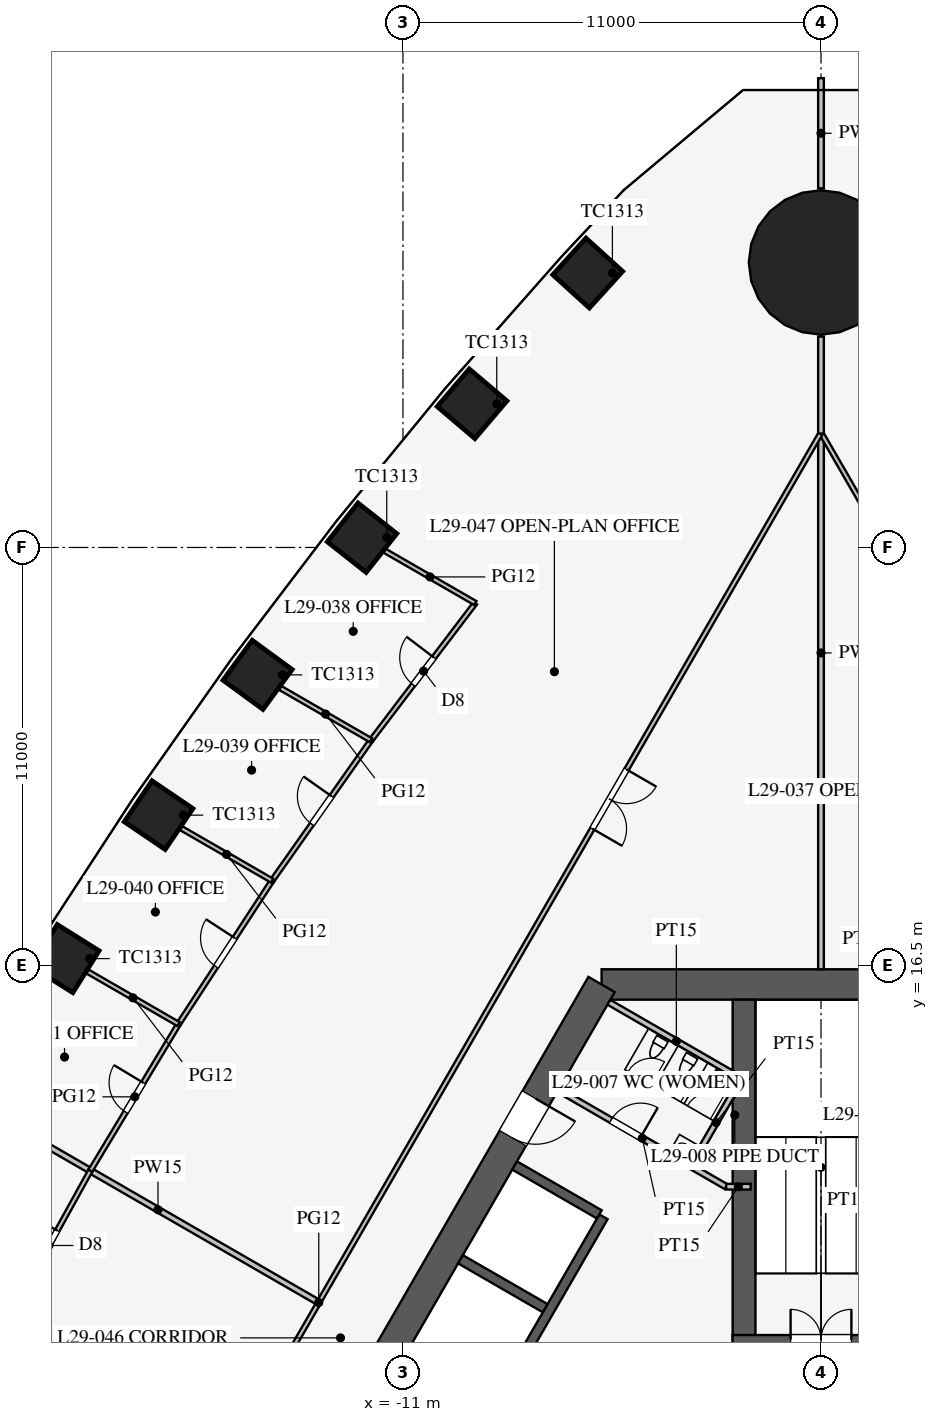
"""IFC4 building model, lengths in metres.
Left out: names, types, materials, properties, quantities, classifications, styles, units other than length and angle.
Written with IfcOpenShell. Run it as: python <this file> out.ifc"""

import sys

from ifc_helpers import new_model, si_unit, direction, frame, frame_2d, origin, origin_2d, place, context, subcontext, project, spatial, rectangle, circle, extrude, element, fill, save


model = new_model("IFC4")
c1 = context("Model", 3, precision=1e-05, world=origin(), true_north=direction((0.0, 1.0)))
c2 = subcontext(c1, "Body", "Model", "MODEL_VIEW")
j1 = project(units=[si_unit("LENGTHUNIT", "METRE"), si_unit("PLANEANGLEUNIT", "RADIAN")], contexts=[c1])
p1 = place(None, origin())
s1 = spatial("IfcSite", under=j1, at=p1, CompositionType="ELEMENT")
p2 = place(p1, origin())
s2 = spatial("IfcBuilding", under=s1, at=p2, CompositionType="ELEMENT")
p3 = place(p2, frame((0.0, 0.0, 128.3)))
s3 = spatial("IfcBuildingStorey", under=s2, at=p3, CompositionType="ELEMENT", Elevation=128.3)
for number, where, z_axis, x_axis in (
    (1, (-6.139, 34.721, 0.0), (0.0, 0.0, 1.0), (-0.672, -0.74, 0.0)),
    (2, (-9.182, 31.282, 0.0), (0.0, 0.0, 1.0), (-0.648, -0.762, 0.0)),
    (3, (-12.077, 27.757, 0.0), (0.0, 0.0, 1.0), (-0.62, -0.785, 0.0)),
    (4, (-14.825, 24.148, 0.0), (0.0, 0.0, 1.0), (-0.591, -0.807, 0.0)),
    (5, (-17.43, 20.456, 0.0), (0.0, 0.0, 1.0), (-0.561, -0.828, 0.0)),
    (6, (-19.893, 16.681, 0.0), (0.0, 0.0, 1.0), (-0.531, -0.847, 0.0)),
):
    element("IfcColumn", number, at=place(p3, frame(where, z_axis=z_axis, x_axis=x_axis)), inside=s3, PredefinedType="COLUMN", context=c2, shape_type="SweptSolid", body=[
        extrude(rectangle(XDim=1.3, YDim=1.3, at=origin_2d()), origin(), (0.0, 0.0, 1.0), 4.2),
    ])
p4 = place(p3, frame((0.0, 35.0, 0.0), z_axis=(0.0, 0.0, 1.0), x_axis=(1.0, 0.0, 0.0)))
e7 = element("IfcColumn", 7, at=p4, inside=s3, PredefinedType="COLUMN", context=c2, shape_type="SweptSolid", body=[
    extrude(circle(Radius=1.9, at=origin_2d()), origin(), (0.0, 0.0, 1.0), 4.2),
])
p5 = place(p3, frame((5.773, 16.0, 0.0), z_axis=(0.0, 0.0, 1.0), x_axis=(-1.0, 0.0, 0.0)))
e8 = element("IfcWall", 8, at=p5, inside=s3, PredefinedType="SHEAR", context=c2, shape_type="SweptSolid", body=[
    extrude(rectangle(XDim=11.547, YDim=0.8, at=frame_2d((5.773, 0.0))), origin(), (0.0, 0.0, 1.0), 4.2),
])
p6 = place(p3, frame((-5.773, 16.0, 0.0), z_axis=(0.0, 0.0, 1.0), x_axis=(-0.500002442456, -0.866023993627, 0.0)))
e9 = element("IfcWall", 9, at=p6, inside=s3, PredefinedType="SHEAR", context=c2, shape_type="SweptSolid", body=[
    extrude(rectangle(XDim=21.939, YDim=0.8, at=frame_2d((10.97, 0.0))), origin(), (0.0, 0.0, 1.0), 4.2),
])
p7 = place(p6, frame((17.27, 0.0, 0.0)))
e10 = element("IfcOpeningElement", 10, at=p7, cuts=e9, PredefinedType="OPENING", context=c2, shape_type="SweptSolid", body=[
    extrude(rectangle(XDim=1.2, YDim=2.1, at=frame_2d((0.6, 1.05))), frame((0.0, 0.41, 0.0), z_axis=(0.0, -1.0, 0.0), x_axis=(1.0, 0.0, 0.0)), (0.0, 0.0, 1.0), 0.82),
])
p8 = place(p6, frame((3.47, 0.0, 0.0)))
e11 = element("IfcOpeningElement", 11, at=p8, cuts=e9, PredefinedType="OPENING", context=c2, shape_type="SweptSolid", body=[
    extrude(rectangle(XDim=1.2, YDim=2.1, at=frame_2d((0.6, 1.05))), frame((0.0, 0.41, 0.0), z_axis=(0.0, -1.0, 0.0), x_axis=(1.0, 0.0, 0.0)), (0.0, 0.0, 1.0), 0.82),
])
p9 = place(p3, frame((-5.724, 9.886, 0.0), z_axis=(0.0, 0.0, 1.0), x_axis=(-0.500001763848, -0.866024385424, 0.0)))
e12 = element("IfcWall", 12, at=p9, inside=s3, PredefinedType="SHEAR", context=c2, shape_type="SweptSolid", body=[
    extrude(rectangle(XDim=11.4, YDim=0.25, at=frame_2d((5.7, 0.0))), origin(), (0.0, 0.0, 1.0), 4.2),
])
p10 = place(p9, frame((6.525, 0.0, 0.0)))
e13 = element("IfcOpeningElement", 13, at=p10, cuts=e12, PredefinedType="OPENING", context=c2, shape_type="SweptSolid", body=[
    extrude(rectangle(XDim=1.2, YDim=2.2, at=frame_2d((0.6, 1.1))), frame((0.0, 0.135, 0.0), z_axis=(0.0, -1.0, 0.0), x_axis=(1.0, 0.0, 0.0)), (0.0, 0.0, 1.0), 0.27),
])
p11 = place(p9, frame((9.375, 0.0, 0.0)))
e14 = element("IfcOpeningElement", 14, at=p11, cuts=e12, PredefinedType="OPENING", context=c2, shape_type="SweptSolid", body=[
    extrude(rectangle(XDim=1.2, YDim=2.2, at=frame_2d((0.6, 1.1))), frame((0.0, 0.135, 0.0), z_axis=(0.0, -1.0, 0.0), x_axis=(1.0, 0.0, 0.0)), (0.0, 0.0, 1.0), 0.27),
])
p12 = place(p3, frame((-5.832, 9.949, 0.0), z_axis=(0.0, 0.0, 1.0), x_axis=(-0.866029291668, 0.499993265928, 0.0)))
e15 = element("IfcWall", 15, at=p12, inside=s3, PredefinedType="SHEAR", context=c2, shape_type="SweptSolid", body=[
    extrude(rectangle(XDim=2.575, YDim=0.25, at=frame_2d((1.288, 0.0))), origin(), (0.0, 0.0, 1.0), 4.2),
])
p13 = place(p3, frame((-7.257, 7.481, 0.0), z_axis=(0.0, 0.0, 1.0), x_axis=(-0.866046643894, 0.499963209246, 0.0)))
e16 = element("IfcWall", 16, at=p13, inside=s3, PredefinedType="SHEAR", context=c2, shape_type="SweptSolid", body=[
    extrude(rectangle(XDim=2.575, YDim=0.25, at=frame_2d((1.288, 0.0))), origin(), (0.0, 0.0, 1.0), 4.2),
])
p14 = place(p3, frame((-2.025, 6.525, 0.0), z_axis=(0.0, 0.0, 1.0), x_axis=(0.0, 1.0, 0.0)))
e17 = element("IfcWall", 17, at=p14, inside=s3, PredefinedType="SHEAR", context=c2, shape_type="SweptSolid", body=[
    extrude(rectangle(XDim=9.075, YDim=0.6, at=frame_2d((4.538, 0.0))), origin(), (0.0, 0.0, 1.0), 4.2),
])
p15 = place(p3, frame((2.325, 6.65, 0.0), z_axis=(0.0, 0.0, 1.0), x_axis=(-1.0, 0.0, 0.0)))
e18 = element("IfcWall", 18, at=p15, inside=s3, PredefinedType="SHEAR", context=c2, shape_type="SweptSolid", body=[
    extrude(rectangle(XDim=4.65, YDim=0.25, at=frame_2d((2.325, 0.0))), origin(), (0.0, 0.0, 1.0), 4.2),
])
p16 = place(p15, frame((1.525, 0.0, 0.0)))
e19 = element("IfcOpeningElement", 19, at=p16, cuts=e18, PredefinedType="OPENING", context=c2, shape_type="SweptSolid", body=[
    extrude(rectangle(XDim=1.6, YDim=2.1, at=frame_2d((0.8, 1.05))), frame((0.0, 0.135, 0.0), z_axis=(0.0, -1.0, 0.0), x_axis=(1.0, 0.0, 0.0)), (0.0, 0.0, 1.0), 0.27),
])
p17 = place(p3, frame((-2.495, 10.678, 0.0), z_axis=(0.0, 0.0, 1.0), x_axis=(-0.86602216432, 0.500005610874, 0.0)))
e20 = element("IfcWall", 20, at=p17, inside=s3, PredefinedType="PARTITIONING", context=c2, shape_type="SweptSolid", body=[
    extrude(rectangle(XDim=5.1, YDim=0.15, at=frame_2d((2.55, 0.0))), origin(), (0.0, 0.0, 1.0), 4.0),
])
p18 = place(p17, frame((2.6, 0.0, 0.0)))
e21 = element("IfcOpeningElement", 21, at=p18, cuts=e20, PredefinedType="OPENING", context=c2, shape_type="SweptSolid", body=[
    extrude(rectangle(XDim=0.9, YDim=2.1, at=frame_2d((0.45, 1.05))), frame((0.0, 0.085, 0.0), z_axis=(0.0, -1.0, 0.0), x_axis=(1.0, 0.0, 0.0)), (0.0, 0.0, 1.0), 0.17),
])
p19 = place(p3, frame((-2.495, 10.678, 0.0), z_axis=(0.0, 0.0, 1.0), x_axis=(1.0, 0.0, 0.0)))
e22 = element("IfcWall", 22, at=p19, inside=s3, PredefinedType="PARTITIONING", context=c2, shape_type="SweptSolid", body=[
    extrude(rectangle(XDim=0.645, YDim=0.15, at=frame_2d((0.323, 0.0))), origin(), (0.0, 0.0, 1.0), 4.0),
])
p20 = place(p3, frame((-2.031, 13.482, 0.0), z_axis=(0.0, 0.0, 1.0), x_axis=(-0.866050731258, 0.499956128963, 0.0)))
e23 = element("IfcWall", 23, at=p20, inside=s3, PredefinedType="PARTITIONING", context=c2, shape_type="SweptSolid", body=[
    extrude(rectangle(XDim=4.1, YDim=0.15, at=frame_2d((2.05, 0.0))), origin(), (0.0, 0.0, 1.0), 4.0),
])
p21 = place(p3, frame((-3.389, 11.281, 0.0), z_axis=(0.0, 0.0, 1.0), x_axis=(0.499989096993, 0.866031698547, 0.0)))
e24 = element("IfcWall", 24, at=p21, inside=s3, PredefinedType="PARTITIONING", context=c2, shape_type="SweptSolid", body=[
    extrude(rectangle(XDim=2.51, YDim=0.15, at=frame_2d((1.255, 0.0))), origin(), (0.0, 0.0, 1.0), 4.0),
])
p22 = place(p3, frame((0.0, 16.4, 0.0), z_axis=(0.0, 0.0, 1.0), x_axis=(0.0, 1.0, 0.0)))
e25 = element("IfcWall", 25, at=p22, inside=s3, PredefinedType="PARTITIONING", context=c2, shape_type="SweptSolid", body=[
    extrude(rectangle(XDim=16.65, YDim=0.15, at=frame_2d((8.325, 0.0))), origin(), (0.0, 0.0, 1.0), 2.3),
])
p23 = place(p3, frame((0.0, 36.95, 0.0), z_axis=(0.0, 0.0, 1.0), x_axis=(0.0, 1.0, 0.0)))
e26 = element("IfcWall", 26, at=p23, inside=s3, PredefinedType="PARTITIONING", context=c2, shape_type="SweptSolid", body=[
    extrude(rectangle(XDim=2.899, YDim=0.15, at=frame_2d((1.45, 0.0))), origin(), (0.0, 0.0, 1.0), 2.3),
])
p24 = place(p3, frame((26.415, -15.231, 0.0), z_axis=(0.0, 0.0, 1.0), x_axis=(-0.50000091641, 0.866024874695, 0.0)))
e27 = element("IfcWall", 27, at=p24, inside=s3, PredefinedType="PARTITIONING", context=c2, shape_type="SweptSolid", body=[
    extrude(rectangle(XDim=52.796, YDim=0.12, at=frame_2d((26.398, 0.0))), origin(), (0.0, 0.0, 1.0), 2.9),
])
p25 = place(p24, frame((10.2, 0.0, 0.15)))
e28 = element("IfcOpeningElement", 28, at=p25, cuts=e27, PredefinedType="OPENING", context=c2, shape_type="SweptSolid", body=[
    extrude(rectangle(XDim=1.8, YDim=2.1, at=frame_2d((0.9, 1.05))), frame((0.0, 0.07, 0.0), z_axis=(0.0, -1.0, 0.0), x_axis=(1.0, 0.0, 0.0)), (0.0, 0.0, 1.0), 0.14),
])
p26 = place(p24, frame((40.8, 0.0, 0.15)))
e29 = element("IfcOpeningElement", 29, at=p26, cuts=e27, PredefinedType="OPENING", context=c2, shape_type="SweptSolid", body=[
    extrude(rectangle(XDim=1.8, YDim=2.1, at=frame_2d((0.9, 1.05))), frame((0.0, 0.07, 0.0), z_axis=(0.0, -1.0, 0.0), x_axis=(1.0, 0.0, 0.0)), (0.0, 0.0, 1.0), 0.14),
])
p27 = place(p3, frame((-13.268, 7.66, 0.0), z_axis=(0.0, 0.0, 1.0), x_axis=(-0.866015788683, 0.500016653474, 0.0)))
e30 = element("IfcWall", 30, at=p27, inside=s3, PredefinedType="PARTITIONING", context=c2, shape_type="SweptSolid", body=[
    extrude(rectangle(XDim=9.65, YDim=0.15, at=frame_2d((4.825, 0.0))), origin(), (0.0, 0.0, 1.0), 3.2),
])
p28 = place(p3, frame((-0.016, 30.491, 0.0), z_axis=(0.0, 0.0, 1.0), x_axis=(-0.50000091641, -0.866024874695, 0.0)))
e31 = element("IfcWall", 31, at=p28, inside=s3, PredefinedType="PARTITIONING", context=c2, shape_type="SweptSolid", body=[
    extrude(rectangle(XDim=52.796, YDim=0.12, at=frame_2d((26.398, 0.0))), origin(), (0.0, 0.0, 1.0), 2.9),
])
p29 = place(p28, frame((10.2, 0.0, 0.15)))
e32 = element("IfcOpeningElement", 32, at=p29, cuts=e31, PredefinedType="OPENING", context=c2, shape_type="SweptSolid", body=[
    extrude(rectangle(XDim=1.8, YDim=2.1, at=frame_2d((0.9, 1.05))), frame((0.0, 0.07, 0.0), z_axis=(0.0, -1.0, 0.0), x_axis=(1.0, 0.0, 0.0)), (0.0, 0.0, 1.0), 0.14),
])
p30 = place(p28, frame((40.8, 0.0, 0.15)))
e33 = element("IfcOpeningElement", 33, at=p30, cuts=e31, PredefinedType="OPENING", context=c2, shape_type="SweptSolid", body=[
    extrude(rectangle(XDim=1.8, YDim=2.1, at=frame_2d((0.9, 1.05))), frame((0.0, 0.07, 0.0), z_axis=(0.0, -1.0, 0.0), x_axis=(1.0, 0.0, 0.0)), (0.0, 0.0, 1.0), 0.14),
])
p31 = place(p3, frame((-19.226, 11.1, 0.0), z_axis=(0.0, 0.0, 1.0), x_axis=(-0.484292898211, -0.874905931368, 0.0)))
e34 = element("IfcWall", 34, at=p31, inside=s3, PredefinedType="PARTITIONING", context=c2, shape_type="SweptSolid", body=[
    extrude(rectangle(XDim=4.501, YDim=0.12, at=frame_2d((2.25, 0.0))), origin(), (0.0, 0.0, 1.0), 2.9),
])
p32 = place(p31, frame((1.8, 0.0, 0.15)))
e35 = element("IfcOpeningElement", 35, at=p32, cuts=e34, PredefinedType="OPENING", context=c2, shape_type="SweptSolid", body=[
    extrude(rectangle(XDim=0.9, YDim=2.1, at=frame_2d((0.45, 1.05))), frame((0.0, 0.07, 0.0), z_axis=(0.0, -1.0, 0.0), x_axis=(1.0, 0.0, 0.0)), (0.0, 0.0, 1.0), 0.14),
])
p33 = place(p3, frame((-11.842, 22.425, 0.0), z_axis=(0.0, 0.0, 1.0), x_axis=(-0.576023283708, -0.817433285734, 0.0)))
e36 = element("IfcWall", 36, at=p33, inside=s3, PredefinedType="PARTITIONING", context=c2, shape_type="SweptSolid", body=[
    extrude(rectangle(XDim=4.519, YDim=0.12, at=frame_2d((2.259, 0.0))), origin(), (0.0, 0.0, 1.0), 2.9),
])
p34 = place(p33, frame((1.8, 0.0, 0.15)))
e37 = element("IfcOpeningElement", 37, at=p34, cuts=e36, PredefinedType="OPENING", context=c2, shape_type="SweptSolid", body=[
    extrude(rectangle(XDim=0.9, YDim=2.1, at=frame_2d((0.45, 1.05))), frame((0.0, 0.07, 0.0), z_axis=(0.0, -1.0, 0.0), x_axis=(1.0, 0.0, 0.0)), (0.0, 0.0, 1.0), 0.14),
])
p35 = place(p3, frame((-9.096, 26.036, 0.0), z_axis=(0.0, 0.0, 1.0), x_axis=(-0.605240194184, -0.796042905467, 0.0)))
e38 = element("IfcWall", 38, at=p35, inside=s3, PredefinedType="PARTITIONING", context=c2, shape_type="SweptSolid", body=[
    extrude(rectangle(XDim=4.536, YDim=0.12, at=frame_2d((2.268, 0.0))), origin(), (0.0, 0.0, 1.0), 2.9),
])
p36 = place(p35, frame((1.8, 0.0, 0.15)))
e39 = element("IfcOpeningElement", 39, at=p36, cuts=e38, PredefinedType="OPENING", context=c2, shape_type="SweptSolid", body=[
    extrude(rectangle(XDim=0.9, YDim=2.1, at=frame_2d((0.45, 1.05))), frame((0.0, 0.07, 0.0), z_axis=(0.0, -1.0, 0.0), x_axis=(1.0, 0.0, 0.0)), (0.0, 0.0, 1.0), 0.14),
])
p37 = place(p3, frame((-16.905, 14.956, 0.0), z_axis=(0.0, 0.0, 1.0), x_axis=(-0.515548366618, -0.856860479703, 0.0)))
e40 = element("IfcWall", 40, at=p37, inside=s3, PredefinedType="PARTITIONING", context=c2, shape_type="SweptSolid", body=[
    extrude(rectangle(XDim=4.501, YDim=0.12, at=frame_2d((2.25, 0.0))), origin(), (0.0, 0.0, 1.0), 2.9),
])
p38 = place(p37, frame((1.8, 0.0, 0.15)))
e41 = element("IfcOpeningElement", 41, at=p38, cuts=e40, PredefinedType="OPENING", context=c2, shape_type="SweptSolid", body=[
    extrude(rectangle(XDim=0.9, YDim=2.1, at=frame_2d((0.45, 1.05))), frame((0.0, 0.07, 0.0), z_axis=(0.0, -1.0, 0.0), x_axis=(1.0, 0.0, 0.0)), (0.0, 0.0, 1.0), 0.14),
])
p39 = place(p3, frame((-14.444, 18.732, 0.0), z_axis=(0.0, 0.0, 1.0), x_axis=(-0.546069464151, -0.837739900161, 0.0)))
e42 = element("IfcWall", 42, at=p39, inside=s3, PredefinedType="PARTITIONING", context=c2, shape_type="SweptSolid", body=[
    extrude(rectangle(XDim=4.507, YDim=0.12, at=frame_2d((2.253, 0.0))), origin(), (0.0, 0.0, 1.0), 2.9),
])
p40 = place(p39, frame((1.8, 0.0, 0.15)))
e43 = element("IfcOpeningElement", 43, at=p40, cuts=e42, PredefinedType="OPENING", context=c2, shape_type="SweptSolid", body=[
    extrude(rectangle(XDim=0.9, YDim=2.1, at=frame_2d((0.45, 1.05))), frame((0.0, 0.07, 0.0), z_axis=(0.0, -1.0, 0.0), x_axis=(1.0, 0.0, 0.0)), (0.0, 0.0, 1.0), 0.14),
])
p41 = place(p3, frame((-11.842, 22.425, 0.0), z_axis=(0.0, 0.0, 1.0), x_axis=(-0.866053089527, 0.499952043821, 0.0)))
e44 = element("IfcWall", 44, at=p41, inside=s3, PredefinedType="PARTITIONING", context=c2, shape_type="SweptSolid", body=[
    extrude(rectangle(XDim=2.761, YDim=0.12, at=frame_2d((1.381, 0.0))), origin(), (0.0, 0.0, 1.0), 2.9),
])
p42 = place(p3, frame((-9.096, 26.036, 0.0), z_axis=(0.0, 0.0, 1.0), x_axis=(-0.865975970311, 0.500085611514, 0.0)))
e45 = element("IfcWall", 45, at=p42, inside=s3, PredefinedType="PARTITIONING", context=c2, shape_type="SweptSolid", body=[
    extrude(rectangle(XDim=2.754, YDim=0.12, at=frame_2d((1.377, 0.0))), origin(), (0.0, 0.0, 1.0), 2.9),
])
p43 = place(p3, frame((-16.905, 14.956, 0.0), z_axis=(0.0, 0.0, 1.0), x_axis=(-0.866015261085, 0.500017567259, 0.0)))
e46 = element("IfcWall", 46, at=p43, inside=s3, PredefinedType="PARTITIONING", context=c2, shape_type="SweptSolid", body=[
    extrude(rectangle(XDim=2.769, YDim=0.12, at=frame_2d((1.385, 0.0))), origin(), (0.0, 0.0, 1.0), 2.9),
])
p44 = place(p3, frame((-14.444, 18.732, 0.0), z_axis=(0.0, 0.0, 1.0), x_axis=(-0.866023907196, 0.500002592159, 0.0)))
e47 = element("IfcWall", 47, at=p44, inside=s3, PredefinedType="PARTITIONING", context=c2, shape_type="SweptSolid", body=[
    extrude(rectangle(XDim=2.766, YDim=0.12, at=frame_2d((1.383, 0.0))), origin(), (0.0, 0.0, 1.0), 2.9),
])
p45 = place(p18, frame((0.9, 0.0, 0.0), z_axis=(0.0, 0.0, 1.0), x_axis=(-1.0, 0.0, 0.0)))
e48 = element("IfcDoor", 48, at=p45, inside=s3, OperationType="SINGLE_SWING_RIGHT", PredefinedType="DOOR", context=c2, shape_type="SweptSolid", body=[
    extrude(rectangle(XDim=0.9, YDim=2.1, at=frame_2d((0.45, 1.05))), frame((0.0, 0.025, 0.0), z_axis=(0.0, -1.0, 0.0), x_axis=(1.0, 0.0, 0.0)), (0.0, 0.0, 1.0), 0.05),
])
fill(e21, e48)
p46 = place(p16, frame((1.6, 0.0, 0.0), z_axis=(0.0, 0.0, 1.0), x_axis=(-1.0, 0.0, 0.0)))
e49 = element("IfcDoor", 49, at=p46, inside=s3, OperationType="DOUBLE_DOOR_SINGLE_SWING", PredefinedType="DOOR", context=c2, shape_type="SweptSolid", body=[
    extrude(rectangle(XDim=1.6, YDim=2.1, at=frame_2d((0.8, 1.05))), frame((0.0, 0.025, 0.0), z_axis=(0.0, -1.0, 0.0), x_axis=(1.0, 0.0, 0.0)), (0.0, 0.0, 1.0), 0.05),
])
fill(e19, e49)
p47 = place(p8, origin())
e50 = element("IfcDoor", 50, at=p47, inside=s3, OperationType="SINGLE_SWING_LEFT", PredefinedType="DOOR", context=c2, shape_type="SweptSolid", body=[
    extrude(rectangle(XDim=1.2, YDim=2.1, at=frame_2d((0.6, 1.05))), frame((0.0, 0.025, 0.0), z_axis=(0.0, -1.0, 0.0), x_axis=(1.0, 0.0, 0.0)), (0.0, 0.0, 1.0), 0.05),
])
fill(e11, e50)
p48 = place(p36, frame((0.9, 0.0, 0.0), z_axis=(0.0, 0.0, 1.0), x_axis=(-1.0, 0.0, 0.0)))
e51 = element("IfcDoor", 51, at=p48, inside=s3, OperationType="SINGLE_SWING_RIGHT", PredefinedType="DOOR", context=c2, shape_type="SweptSolid", body=[
    extrude(rectangle(XDim=0.9, YDim=2.1, at=frame_2d((0.45, 1.05))), frame((0.0, 0.025, 0.0), z_axis=(0.0, -1.0, 0.0), x_axis=(1.0, 0.0, 0.0)), (0.0, 0.0, 1.0), 0.05),
])
fill(e39, e51)
p49 = place(p34, frame((0.9, 0.0, 0.0), z_axis=(0.0, 0.0, 1.0), x_axis=(-1.0, 0.0, 0.0)))
e52 = element("IfcDoor", 52, at=p49, inside=s3, OperationType="SINGLE_SWING_RIGHT", PredefinedType="DOOR", context=c2, shape_type="SweptSolid", body=[
    extrude(rectangle(XDim=0.9, YDim=2.1, at=frame_2d((0.45, 1.05))), frame((0.0, 0.025, 0.0), z_axis=(0.0, -1.0, 0.0), x_axis=(1.0, 0.0, 0.0)), (0.0, 0.0, 1.0), 0.05),
])
fill(e37, e52)
p50 = place(p40, frame((0.9, 0.0, 0.0), z_axis=(0.0, 0.0, 1.0), x_axis=(-1.0, 0.0, 0.0)))
e53 = element("IfcDoor", 53, at=p50, inside=s3, OperationType="SINGLE_SWING_RIGHT", PredefinedType="DOOR", context=c2, shape_type="SweptSolid", body=[
    extrude(rectangle(XDim=0.9, YDim=2.1, at=frame_2d((0.45, 1.05))), frame((0.0, 0.025, 0.0), z_axis=(0.0, -1.0, 0.0), x_axis=(1.0, 0.0, 0.0)), (0.0, 0.0, 1.0), 0.05),
])
fill(e43, e53)
p51 = place(p38, frame((0.9, 0.0, 0.0), z_axis=(0.0, 0.0, 1.0), x_axis=(-1.0, 0.0, 0.0)))
e54 = element("IfcDoor", 54, at=p51, inside=s3, OperationType="SINGLE_SWING_RIGHT", PredefinedType="DOOR", context=c2, shape_type="SweptSolid", body=[
    extrude(rectangle(XDim=0.9, YDim=2.1, at=frame_2d((0.45, 1.05))), frame((0.0, 0.025, 0.0), z_axis=(0.0, -1.0, 0.0), x_axis=(1.0, 0.0, 0.0)), (0.0, 0.0, 1.0), 0.05),
])
fill(e41, e54)
p52 = place(p32, frame((0.9, 0.0, 0.0), z_axis=(0.0, 0.0, 1.0), x_axis=(-1.0, 0.0, 0.0)))
e55 = element("IfcDoor", 55, at=p52, inside=s3, OperationType="SINGLE_SWING_RIGHT", PredefinedType="DOOR", context=c2, shape_type="SweptSolid", body=[
    extrude(rectangle(XDim=0.9, YDim=2.1, at=frame_2d((0.45, 1.05))), frame((0.0, 0.025, 0.0), z_axis=(0.0, -1.0, 0.0), x_axis=(1.0, 0.0, 0.0)), (0.0, 0.0, 1.0), 0.05),
])
fill(e35, e55)
p53 = place(p29, origin())
e56 = element("IfcDoor", 56, at=p53, inside=s3, OperationType="DOUBLE_DOOR_SINGLE_SWING", PredefinedType="DOOR", context=c2, shape_type="SweptSolid", body=[
    extrude(rectangle(XDim=1.8, YDim=2.1, at=frame_2d((0.9, 1.05))), frame((0.0, 0.025, 0.0), z_axis=(0.0, -1.0, 0.0), x_axis=(1.0, 0.0, 0.0)), (0.0, 0.0, 1.0), 0.05),
])
fill(e32, e56)
save(model, sys.argv[1])
